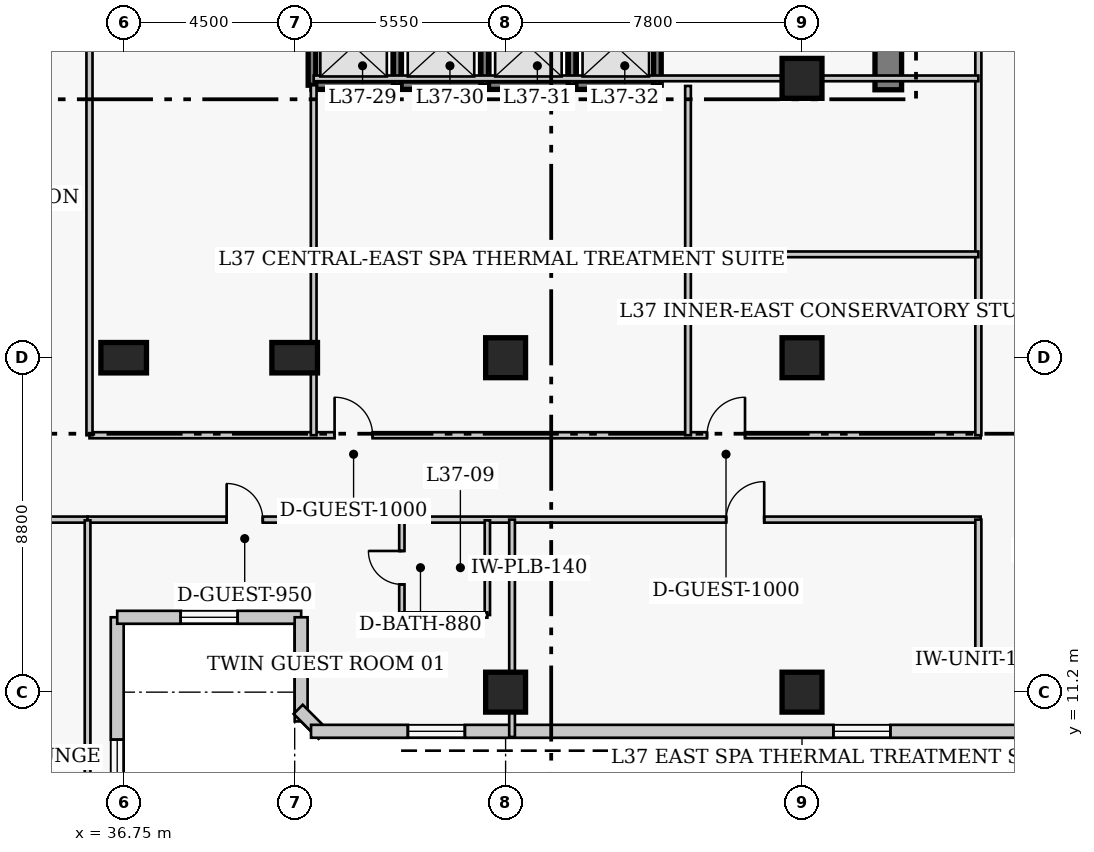
"""IFC4 building model, lengths in metres.
Left out: names, types, materials, properties, quantities, classifications, styles, units other than length and angle.
Written with IfcOpenShell. Run it as: python <this file> out.ifc"""

import sys

from ifc_helpers import new_model, si_unit, direction, frame, frame_2d, origin, origin_2d, place, context, subcontext, project, spatial, rectangle, extrude, element, fill, save


model = new_model("IFC4")
c1 = context("Model", 3, precision=1e-05, world=origin(), true_north=direction((0.0, 1.0)))
c2 = subcontext(c1, "Body", "Model", "MODEL_VIEW")
j1 = project(units=[si_unit("LENGTHUNIT", "METRE"), si_unit("PLANEANGLEUNIT", "RADIAN")], contexts=[c1])
p1 = place(None, origin())
s1 = spatial("IfcSite", under=j1, at=p1, CompositionType="ELEMENT")
p2 = place(p1, origin())
s2 = spatial("IfcBuilding", under=s1, at=p2, CompositionType="ELEMENT")
p3 = place(p2, frame((0.0, 0.0, 149.8)))
s3 = spatial("IfcBuildingStorey", under=s2, at=p3, CompositionType="ELEMENT", Elevation=149.8)
p4 = place(p3, frame((56.87, 27.05, 0.0), z_axis=(0.0, 0.0, 1.0), x_axis=(0.0, 1.0, 0.0)))
e1 = element("IfcWall", 1, at=p4, inside=s3, PredefinedType="SHEAR", context=c2, shape_type="SweptSolid", body=[
    extrude(rectangle(XDim=13.62, YDim=0.7, at=frame_2d((6.81, 0.0))), origin(), (0.0, 0.0, 1.0), 3.8),
])
for number, where, z_axis, x_axis in (
    (2, (36.75, 20.0, 0.0), (0.0, 0.0, 1.0), (1.0, 0.0, 0.0)),
    (3, (41.25, 20.0, 0.0), (0.0, 0.0, 1.0), (1.0, 0.0, 0.0)),
):
    element("IfcColumn", number, at=place(p3, frame(where, z_axis=z_axis, x_axis=x_axis)), inside=s3, PredefinedType="COLUMN", context=c2, shape_type="SweptSolid", body=[
        extrude(rectangle(XDim=1.2, YDim=0.8, at=origin_2d()), origin(), (0.0, 0.0, 1.0), 3.8),
    ])
for number, where, z_axis, x_axis in (
    (4, (46.8, 11.2, 0.0), (0.0, 0.0, 1.0), (1.0, 0.0, 0.0)),
    (5, (46.8, 20.0, 0.0), (0.0, 0.0, 1.0), (1.0, 0.0, 0.0)),
    (6, (54.6, 11.2, 0.0), (0.0, 0.0, 1.0), (1.0, 0.0, 0.0)),
    (7, (54.6, 20.0, 0.0), (0.0, 0.0, 1.0), (1.0, 0.0, 0.0)),
    (8, (54.6, 27.35, 0.0), (0.0, 0.0, 1.0), (1.0, 0.0, 0.0)),
):
    element("IfcColumn", number, at=place(p3, frame(where, z_axis=z_axis, x_axis=x_axis)), inside=s3, PredefinedType="COLUMN", context=c2, shape_type="SweptSolid", body=[
        extrude(rectangle(XDim=1.05, YDim=1.05, at=origin_2d()), origin(), (0.0, 0.0, 1.0), 3.8),
    ])
p5 = place(p3, frame((36.58, 5.23, 0.0), z_axis=(0.0, 0.0, 1.0), x_axis=(0.0, 1.0, 0.0)))
e9 = element("IfcWall", 9, at=p5, inside=s3, PredefinedType="SOLIDWALL", context=c2, shape_type="SweptSolid", body=[
    extrude(rectangle(XDim=7.94, YDim=0.34, at=frame_2d((3.97, 0.0))), origin(), (0.0, 0.0, 1.0), 3.55),
])
p6 = place(p5, frame((3.22, 0.0, 0.85)))
e10 = element("IfcOpeningElement", 10, at=p6, cuts=e9, PredefinedType="OPENING", context=c2, shape_type="SweptSolid", body=[
    extrude(rectangle(XDim=1.5, YDim=1.75, at=frame_2d((0.75, 0.875))), frame((0.0, 0.18, 0.0), z_axis=(0.0, -1.0, 0.0), x_axis=(1.0, 0.0, 0.0)), (0.0, 0.0, 1.0), 0.36),
])
p7 = place(p3, frame((36.58, 13.17, 0.0), z_axis=(0.0, 0.0, 1.0), x_axis=(1.0, 0.0, 0.0)))
e11 = element("IfcWall", 11, at=p7, inside=s3, PredefinedType="SOLIDWALL", context=c2, shape_type="SweptSolid", body=[
    extrude(rectangle(XDim=4.84, YDim=0.34, at=frame_2d((2.42, 0.0))), origin(), (0.0, 0.0, 1.0), 3.55),
])
p8 = place(p7, frame((1.67, 0.0, 0.85)))
e12 = element("IfcOpeningElement", 12, at=p8, cuts=e11, PredefinedType="OPENING", context=c2, shape_type="SweptSolid", body=[
    extrude(rectangle(XDim=1.5, YDim=1.75, at=frame_2d((0.75, 0.875))), frame((0.0, 0.18, 0.0), z_axis=(0.0, -1.0, 0.0), x_axis=(1.0, 0.0, 0.0)), (0.0, 0.0, 1.0), 0.36),
])
p9 = place(p3, frame((41.42, 13.17, 0.0), z_axis=(0.0, 0.0, 1.0), x_axis=(0.0, -1.0, 0.0)))
e13 = element("IfcWall", 13, at=p9, inside=s3, PredefinedType="SOLIDWALL", context=c2, shape_type="SweptSolid", body=[
    extrude(rectangle(XDim=2.74, YDim=0.34, at=frame_2d((1.37, 0.0))), origin(), (0.0, 0.0, 1.0), 3.55),
])
p10 = place(p3, frame((41.342, 10.749, 0.0), z_axis=(0.0, 0.0, 1.0), x_axis=(0.707106781187, -0.707106781187, 0.0)))
e14 = element("IfcWall", 14, at=p10, inside=s3, PredefinedType="SOLIDWALL", context=c2, shape_type="SweptSolid", body=[
    extrude(rectangle(XDim=0.929, YDim=0.34, at=frame_2d((0.464, 0.0))), origin(), (0.0, 0.0, 1.0), 3.55),
])
p11 = place(p3, frame((41.68, 10.17, 0.0), z_axis=(0.0, 0.0, 1.0), x_axis=(1.0, 0.0, 0.0)))
e15 = element("IfcWall", 15, at=p11, inside=s3, PredefinedType="SOLIDWALL", context=c2, shape_type="SweptSolid", body=[
    extrude(rectangle(XDim=26.69, YDim=0.34, at=frame_2d((13.345, 0.0))), origin(), (0.0, 0.0, 1.0), 3.55),
])
p12 = place(p11, frame((2.548, 0.0, 0.85)))
e16 = element("IfcOpeningElement", 16, at=p12, cuts=e15, PredefinedType="OPENING", context=c2, shape_type="SweptSolid", body=[
    extrude(rectangle(XDim=1.5, YDim=1.75, at=frame_2d((0.75, 0.875))), frame((0.0, 0.18, 0.0), z_axis=(0.0, -1.0, 0.0), x_axis=(1.0, 0.0, 0.0)), (0.0, 0.0, 1.0), 0.36),
])
p13 = place(p11, frame((13.745, 0.0, 0.85)))
e17 = element("IfcOpeningElement", 17, at=p13, cuts=e15, PredefinedType="OPENING", context=c2, shape_type="SweptSolid", body=[
    extrude(rectangle(XDim=1.5, YDim=1.75, at=frame_2d((0.75, 0.875))), frame((0.0, 0.18, 0.0), z_axis=(0.0, -1.0, 0.0), x_axis=(1.0, 0.0, 0.0)), (0.0, 0.0, 1.0), 0.36),
])
p14 = place(p11, frame((21.492, 0.0, 0.85)))
e18 = element("IfcOpeningElement", 18, at=p14, cuts=e15, PredefinedType="OPENING", context=c2, shape_type="SweptSolid", body=[
    extrude(rectangle(XDim=1.5, YDim=1.75, at=frame_2d((0.75, 0.875))), frame((0.0, 0.18, 0.0), z_axis=(0.0, -1.0, 0.0), x_axis=(1.0, 0.0, 0.0)), (0.0, 0.0, 1.0), 0.36),
])
p15 = place(p3, frame((41.705, 27.17, 0.0), z_axis=(0.0, 0.0, 1.0), x_axis=(1.0, 0.0, 0.0)))
e19 = element("IfcWall", 19, at=p15, inside=s3, PredefinedType="SHEAR", context=c2, shape_type="SweptSolid", body=[
    extrude(rectangle(XDim=2.245, YDim=0.22, at=frame_2d((1.123, 0.0))), origin(), (0.0, 0.0, 1.0), 3.8),
])
p16 = place(p3, frame((41.705, 27.17, 0.0), z_axis=(0.0, 0.0, 1.0), x_axis=(0.0, 1.0, 0.0)))
e20 = element("IfcWall", 20, at=p16, inside=s3, PredefinedType="SHEAR", context=c2, shape_type="SweptSolid", body=[
    extrude(rectangle(XDim=2.06, YDim=0.2, at=frame_2d((1.03, 0.0))), origin(), (0.0, 0.0, 1.0), 3.8),
])
p17 = place(p3, frame((43.95, 27.17, 0.0), z_axis=(0.0, 0.0, 1.0), x_axis=(1.0, 0.0, 0.0)))
e21 = element("IfcWall", 21, at=p17, inside=s3, PredefinedType="SHEAR", context=c2, shape_type="SweptSolid", body=[
    extrude(rectangle(XDim=2.3, YDim=0.22, at=frame_2d((1.15, 0.0))), origin(), (0.0, 0.0, 1.0), 3.8),
])
p18 = place(p3, frame((43.95, 27.17, 0.0), z_axis=(0.0, 0.0, 1.0), x_axis=(0.0, 1.0, 0.0)))
e22 = element("IfcWall", 22, at=p18, inside=s3, PredefinedType="SHEAR", context=c2, shape_type="SweptSolid", body=[
    extrude(rectangle(XDim=2.06, YDim=0.2, at=frame_2d((1.03, 0.0))), origin(), (0.0, 0.0, 1.0), 3.8),
])
p19 = place(p3, frame((46.25, 27.17, 0.0), z_axis=(0.0, 0.0, 1.0), x_axis=(1.0, 0.0, 0.0)))
e23 = element("IfcWall", 23, at=p19, inside=s3, PredefinedType="SHEAR", context=c2, shape_type="SweptSolid", body=[
    extrude(rectangle(XDim=2.3, YDim=0.22, at=frame_2d((1.15, 0.0))), origin(), (0.0, 0.0, 1.0), 3.8),
])
p20 = place(p3, frame((46.25, 27.17, 0.0), z_axis=(0.0, 0.0, 1.0), x_axis=(0.0, 1.0, 0.0)))
e24 = element("IfcWall", 24, at=p20, inside=s3, PredefinedType="SHEAR", context=c2, shape_type="SweptSolid", body=[
    extrude(rectangle(XDim=2.06, YDim=0.2, at=frame_2d((1.03, 0.0))), origin(), (0.0, 0.0, 1.0), 3.8),
])
p21 = place(p3, frame((48.55, 27.17, 0.0), z_axis=(0.0, 0.0, 1.0), x_axis=(1.0, 0.0, 0.0)))
e25 = element("IfcWall", 25, at=p21, inside=s3, PredefinedType="SHEAR", context=c2, shape_type="SweptSolid", body=[
    extrude(rectangle(XDim=2.245, YDim=0.22, at=frame_2d((1.123, 0.0))), origin(), (0.0, 0.0, 1.0), 3.8),
])
for number, where, z_axis, x_axis in (
    (26, (48.55, 27.17, 0.0), (0.0, 0.0, 1.0), (0.0, 1.0, 0.0)),
    (27, (50.795, 27.17, 0.0), (0.0, 0.0, 1.0), (0.0, 1.0, 0.0)),
):
    element("IfcWall", number, at=place(p3, frame(where, z_axis=z_axis, x_axis=x_axis)), inside=s3, PredefinedType="SHEAR", context=c2, shape_type="SweptSolid", body=[
        extrude(rectangle(XDim=2.06, YDim=0.2, at=frame_2d((1.03, 0.0))), origin(), (0.0, 0.0, 1.0), 3.8),
    ])
p22 = place(p3, frame((35.85, 17.96, 0.0), z_axis=(0.0, 0.0, 1.0), x_axis=(1.0, 0.0, 0.0)))
e28 = element("IfcWall", 28, at=p22, inside=s3, PredefinedType="PARTITIONING", context=c2, shape_type="SweptSolid", body=[
    extrude(rectangle(XDim=23.45, YDim=0.16, at=frame_2d((11.725, 0.0))), origin(), (0.0, 0.0, 1.0), 3.55),
])
p23 = place(p22, frame((6.45, 0.0, 0.0)))
e29 = element("IfcOpeningElement", 29, at=p23, cuts=e28, PredefinedType="OPENING", context=c2, shape_type="SweptSolid", body=[
    extrude(rectangle(XDim=1.0, YDim=2.15, at=frame_2d((0.5, 1.075))), frame((0.0, 0.09, 0.0), z_axis=(0.0, -1.0, 0.0), x_axis=(1.0, 0.0, 0.0)), (0.0, 0.0, 1.0), 0.18),
])
p24 = place(p22, frame((16.25, 0.0, 0.0)))
e30 = element("IfcOpeningElement", 30, at=p24, cuts=e28, PredefinedType="OPENING", context=c2, shape_type="SweptSolid", body=[
    extrude(rectangle(XDim=1.0, YDim=2.15, at=frame_2d((0.5, 1.075))), frame((0.0, 0.09, 0.0), z_axis=(0.0, -1.0, 0.0), x_axis=(1.0, 0.0, 0.0)), (0.0, 0.0, 1.0), 0.18),
])
p25 = place(p3, frame((35.85, 17.96, 0.0), z_axis=(0.0, 0.0, 1.0), x_axis=(0.0, 1.0, 0.0)))
e31 = element("IfcWall", 31, at=p25, inside=s3, PredefinedType="PARTITIONING", context=c2, shape_type="SweptSolid", body=[
    extrude(rectangle(XDim=11.59, YDim=0.16, at=frame_2d((5.795, 0.0))), origin(), (0.0, 0.0, 1.0), 3.55),
])
p26 = place(p3, frame((18.8, 15.74, 0.0), z_axis=(0.0, 0.0, 1.0), x_axis=(1.0, 0.0, 0.0)))
e32 = element("IfcWall", 32, at=p26, inside=s3, PredefinedType="PARTITIONING", context=c2, shape_type="SweptSolid", body=[
    extrude(rectangle(XDim=17.0, YDim=0.16, at=frame_2d((8.5, 0.0))), origin(), (0.0, 0.0, 1.0), 3.55),
])
p27 = place(p26, frame((8.03, 0.0, 0.0)))
e33 = element("IfcOpeningElement", 33, at=p27, cuts=e32, PredefinedType="OPENING", context=c2, shape_type="SweptSolid", body=[
    extrude(rectangle(XDim=1.0, YDim=2.15, at=frame_2d((0.5, 1.075))), frame((0.0, 0.09, 0.0), z_axis=(0.0, -1.0, 0.0), x_axis=(1.0, 0.0, 0.0)), (0.0, 0.0, 1.0), 0.18),
])
p28 = place(p3, frame((35.8, 15.74, 0.0), z_axis=(0.0, 0.0, 1.0), x_axis=(1.0, 0.0, 0.0)))
e34 = element("IfcWall", 34, at=p28, inside=s3, PredefinedType="PARTITIONING", context=c2, shape_type="SweptSolid", body=[
    extrude(rectangle(XDim=23.5, YDim=0.16, at=frame_2d((11.75, 0.0))), origin(), (0.0, 0.0, 1.0), 3.55),
])
p29 = place(p28, frame((3.66, 0.0, 0.0)))
e35 = element("IfcOpeningElement", 35, at=p29, cuts=e34, PredefinedType="OPENING", context=c2, shape_type="SweptSolid", body=[
    extrude(rectangle(XDim=0.95, YDim=2.1, at=frame_2d((0.475, 1.05))), frame((0.0, 0.09, 0.0), z_axis=(0.0, -1.0, 0.0), x_axis=(1.0, 0.0, 0.0)), (0.0, 0.0, 1.0), 0.18),
])
p30 = place(p28, frame((16.805, 0.0, 0.0)))
e36 = element("IfcOpeningElement", 36, at=p30, cuts=e34, PredefinedType="OPENING", context=c2, shape_type="SweptSolid", body=[
    extrude(rectangle(XDim=1.0, YDim=2.15, at=frame_2d((0.5, 1.075))), frame((0.0, 0.09, 0.0), z_axis=(0.0, -1.0, 0.0), x_axis=(1.0, 0.0, 0.0)), (0.0, 0.0, 1.0), 0.18),
])
p31 = place(p3, frame((59.24, 17.96, 0.0), z_axis=(0.0, 0.0, 1.0), x_axis=(0.0, 1.0, 0.0)))
e37 = element("IfcWall", 37, at=p31, inside=s3, PredefinedType="PARTITIONING", context=c2, shape_type="SweptSolid", body=[
    extrude(rectangle(XDim=22.69, YDim=0.16, at=frame_2d((11.345, 0.0))), origin(), (0.0, 0.0, 1.0), 3.55),
])
p32 = place(p3, frame((59.24, 12.05, 0.0), z_axis=(0.0, 0.0, 1.0), x_axis=(0.0, 1.0, 0.0)))
e38 = element("IfcWall", 38, at=p32, inside=s3, PredefinedType="PARTITIONING", context=c2, shape_type="SweptSolid", body=[
    extrude(rectangle(XDim=3.69, YDim=0.16, at=frame_2d((1.845, 0.0))), origin(), (0.0, 0.0, 1.0), 3.55),
])
p33 = place(p3, frame((59.24, 12.05, 0.0), z_axis=(0.0, 0.0, 1.0), x_axis=(1.0, 0.0, 0.0)))
e39 = element("IfcWall", 39, at=p33, inside=s3, PredefinedType="PARTITIONING", context=c2, shape_type="SweptSolid", body=[
    extrude(rectangle(XDim=2.22, YDim=0.15, at=frame_2d((1.11, 0.0))), origin(), (0.0, 0.0, 1.0), 3.55),
])
p34 = place(p3, frame((41.75, 17.96, 0.0), z_axis=(0.0, 0.0, 1.0), x_axis=(0.0, 1.0, 0.0)))
e40 = element("IfcWall", 40, at=p34, inside=s3, PredefinedType="PARTITIONING", context=c2, shape_type="SweptSolid", body=[
    extrude(rectangle(XDim=9.21, YDim=0.15, at=frame_2d((4.605, 0.0))), origin(), (0.0, 0.0, 1.0), 3.55),
])
p35 = place(p3, frame((51.6, 17.96, 0.0), z_axis=(0.0, 0.0, 1.0), x_axis=(0.0, 1.0, 0.0)))
e41 = element("IfcWall", 41, at=p35, inside=s3, PredefinedType="PARTITIONING", context=c2, shape_type="SweptSolid", body=[
    extrude(rectangle(XDim=9.19, YDim=0.15, at=frame_2d((4.595, 0.0))), origin(), (0.0, 0.0, 1.0), 3.55),
])
p36 = place(p3, frame((41.75, 27.35, 0.0), z_axis=(0.0, 0.0, 1.0), x_axis=(1.0, 0.0, 0.0)))
e42 = element("IfcWall", 42, at=p36, inside=s3, PredefinedType="PARTITIONING", context=c2, shape_type="SweptSolid", body=[
    extrude(rectangle(XDim=17.49, YDim=0.15, at=frame_2d((8.745, 0.0))), origin(), (0.0, 0.0, 1.0), 3.55),
])
p37 = place(p3, frame((51.6, 22.72, 0.0), z_axis=(0.0, 0.0, 1.0), x_axis=(1.0, 0.0, 0.0)))
e43 = element("IfcWall", 43, at=p37, inside=s3, PredefinedType="PARTITIONING", context=c2, shape_type="SweptSolid", body=[
    extrude(rectangle(XDim=7.64, YDim=0.15, at=frame_2d((3.82, 0.0))), origin(), (0.0, 0.0, 1.0), 3.55),
])
p38 = place(p3, frame((35.8, 4.82, 0.0), z_axis=(0.0, 0.0, 1.0), x_axis=(0.0, 1.0, 0.0)))
e44 = element("IfcWall", 44, at=p38, inside=s3, PredefinedType="PARTITIONING", context=c2, shape_type="SweptSolid", body=[
    extrude(rectangle(XDim=10.9, YDim=0.15, at=frame_2d((5.45, 0.0))), origin(), (0.0, 0.0, 1.0), 3.55),
])
p39 = place(p3, frame((44.07, 13.23, 0.0), z_axis=(0.0, 0.0, 1.0), x_axis=(0.0, 1.0, 0.0)))
e45 = element("IfcWall", 45, at=p39, inside=s3, PredefinedType="PLUMBINGWALL", context=c2, shape_type="SweptSolid", body=[
    extrude(rectangle(XDim=2.49, YDim=0.14, at=frame_2d((1.245, 0.0))), origin(), (0.0, 0.0, 1.0), 3.55),
])
p40 = place(p39, frame((0.805, 0.0, 0.0)))
e46 = element("IfcOpeningElement", 46, at=p40, cuts=e45, PredefinedType="OPENING", context=c2, shape_type="SweptSolid", body=[
    extrude(rectangle(XDim=0.88, YDim=2.05, at=frame_2d((0.44, 1.025))), frame((0.0, 0.08, 0.0), z_axis=(0.0, -1.0, 0.0), x_axis=(1.0, 0.0, 0.0)), (0.0, 0.0, 1.0), 0.16),
])
p41 = place(p3, frame((46.32, 13.23, 0.0), z_axis=(0.0, 0.0, 1.0), x_axis=(0.0, 1.0, 0.0)))
e47 = element("IfcWall", 47, at=p41, inside=s3, PredefinedType="PLUMBINGWALL", context=c2, shape_type="SweptSolid", body=[
    extrude(rectangle(XDim=2.49, YDim=0.14, at=frame_2d((1.245, 0.0))), origin(), (0.0, 0.0, 1.0), 3.55),
])
p42 = place(p3, frame((44.07, 13.23, 0.0), z_axis=(0.0, 0.0, 1.0), x_axis=(1.0, 0.0, 0.0)))
e48 = element("IfcWall", 48, at=p42, inside=s3, PredefinedType="PLUMBINGWALL", context=c2, shape_type="SweptSolid", body=[
    extrude(rectangle(XDim=2.25, YDim=0.14, at=frame_2d((1.125, 0.0))), origin(), (0.0, 0.0, 1.0), 3.55),
])
p43 = place(p3, frame((46.97, 10.02, 0.0), z_axis=(0.0, 0.0, 1.0), x_axis=(0.0, 1.0, 0.0)))
e49 = element("IfcWall", 49, at=p43, inside=s3, PredefinedType="PARTITIONING", context=c2, shape_type="SweptSolid", body=[
    extrude(rectangle(XDim=5.72, YDim=0.15, at=frame_2d((2.86, 0.0))), origin(), (0.0, 0.0, 1.0), 2.9),
])
p44 = place(p6, origin())
e50 = element("IfcWindow", 50, at=p44, inside=s3, PartitioningType="SINGLE_PANEL", PredefinedType="WINDOW", context=c2, shape_type="SweptSolid", body=[
    extrude(rectangle(XDim=1.5, YDim=1.75, at=frame_2d((0.75, 0.875))), frame((0.0, 0.03, 0.0), z_axis=(0.0, -1.0, 0.0), x_axis=(1.0, 0.0, 0.0)), (0.0, 0.0, 1.0), 0.06),
])
fill(e10, e50)
p45 = place(p8, origin())
e51 = element("IfcWindow", 51, at=p45, inside=s3, PartitioningType="SINGLE_PANEL", PredefinedType="WINDOW", context=c2, shape_type="SweptSolid", body=[
    extrude(rectangle(XDim=1.5, YDim=1.75, at=frame_2d((0.75, 0.875))), frame((0.0, 0.03, 0.0), z_axis=(0.0, -1.0, 0.0), x_axis=(1.0, 0.0, 0.0)), (0.0, 0.0, 1.0), 0.06),
])
fill(e12, e51)
p46 = place(p12, origin())
e52 = element("IfcWindow", 52, at=p46, inside=s3, PartitioningType="SINGLE_PANEL", PredefinedType="WINDOW", context=c2, shape_type="SweptSolid", body=[
    extrude(rectangle(XDim=1.5, YDim=1.75, at=frame_2d((0.75, 0.875))), frame((0.0, 0.03, 0.0), z_axis=(0.0, -1.0, 0.0), x_axis=(1.0, 0.0, 0.0)), (0.0, 0.0, 1.0), 0.06),
])
fill(e16, e52)
p47 = place(p13, origin())
e53 = element("IfcWindow", 53, at=p47, inside=s3, PartitioningType="SINGLE_PANEL", PredefinedType="WINDOW", context=c2, shape_type="SweptSolid", body=[
    extrude(rectangle(XDim=1.5, YDim=1.75, at=frame_2d((0.75, 0.875))), frame((0.0, 0.03, 0.0), z_axis=(0.0, -1.0, 0.0), x_axis=(1.0, 0.0, 0.0)), (0.0, 0.0, 1.0), 0.06),
])
fill(e17, e53)
p48 = place(p23, origin())
e54 = element("IfcDoor", 54, at=p48, inside=s3, OperationType="SINGLE_SWING_LEFT", PredefinedType="DOOR", context=c2, shape_type="SweptSolid", body=[
    extrude(rectangle(XDim=1.0, YDim=2.15, at=frame_2d((0.5, 1.075))), frame((0.0, 0.025, 0.0), z_axis=(0.0, -1.0, 0.0), x_axis=(1.0, 0.0, 0.0)), (0.0, 0.0, 1.0), 0.05),
])
fill(e29, e54)
p49 = place(p24, origin())
e55 = element("IfcDoor", 55, at=p49, inside=s3, OperationType="SINGLE_SWING_RIGHT", PredefinedType="DOOR", context=c2, shape_type="SweptSolid", body=[
    extrude(rectangle(XDim=1.0, YDim=2.15, at=frame_2d((0.5, 1.075))), frame((0.0, 0.025, 0.0), z_axis=(0.0, -1.0, 0.0), x_axis=(1.0, 0.0, 0.0)), (0.0, 0.0, 1.0), 0.05),
])
fill(e30, e55)
p50 = place(p40, origin())
e56 = element("IfcDoor", 56, at=p50, inside=s3, OperationType="SINGLE_SWING_RIGHT", PredefinedType="DOOR", context=c2, shape_type="SweptSolid", body=[
    extrude(rectangle(XDim=0.88, YDim=2.05, at=frame_2d((0.44, 1.025))), frame((0.0, 0.025, 0.0), z_axis=(0.0, -1.0, 0.0), x_axis=(1.0, 0.0, 0.0)), (0.0, 0.0, 1.0), 0.05),
])
fill(e46, e56)
p51 = place(p29, origin())
e57 = element("IfcDoor", 57, at=p51, inside=s3, OperationType="SINGLE_SWING_LEFT", PredefinedType="DOOR", context=c2, shape_type="SweptSolid", body=[
    extrude(rectangle(XDim=0.95, YDim=2.1, at=frame_2d((0.475, 1.05))), frame((0.0, 0.025, 0.0), z_axis=(0.0, -1.0, 0.0), x_axis=(1.0, 0.0, 0.0)), (0.0, 0.0, 1.0), 0.05),
])
fill(e35, e57)
p52 = place(p30, origin())
e58 = element("IfcDoor", 58, at=p52, inside=s3, OperationType="SINGLE_SWING_RIGHT", PredefinedType="DOOR", context=c2, shape_type="SweptSolid", body=[
    extrude(rectangle(XDim=1.0, YDim=2.15, at=frame_2d((0.5, 1.075))), frame((0.0, 0.025, 0.0), z_axis=(0.0, -1.0, 0.0), x_axis=(1.0, 0.0, 0.0)), (0.0, 0.0, 1.0), 0.05),
])
fill(e36, e58)
save(model, sys.argv[1])
